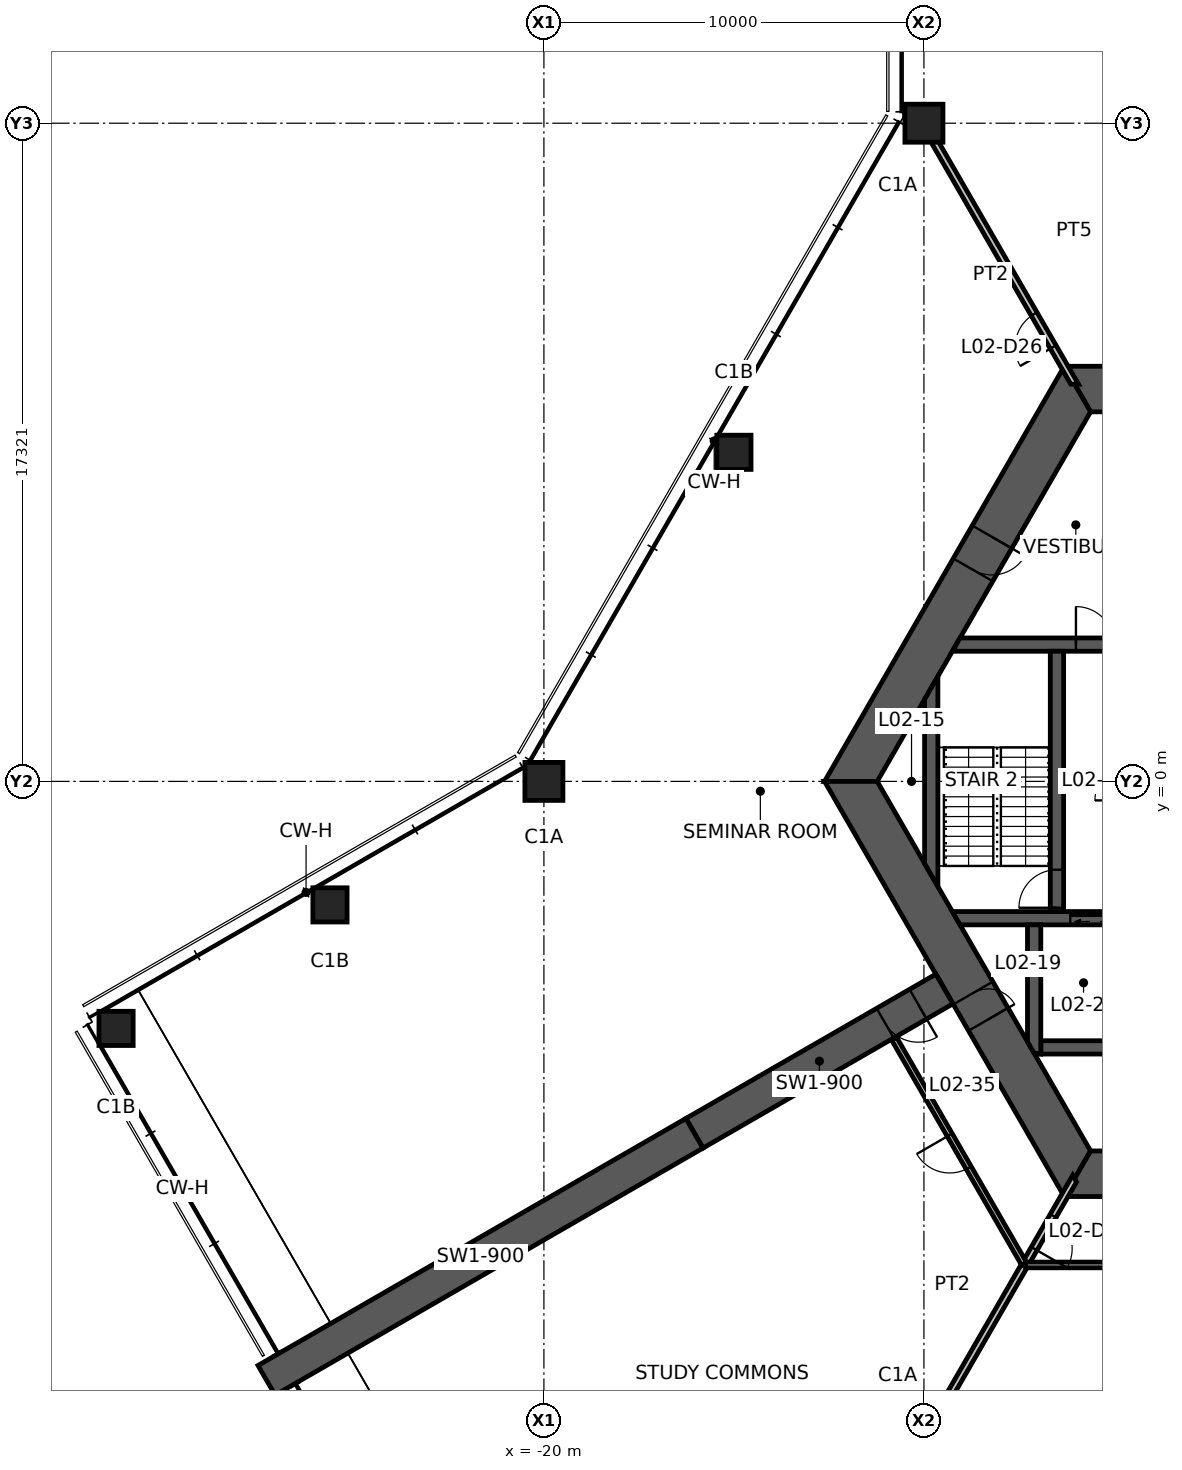
"""IFC4 building model, lengths in metres.
Left out: names, types, materials, properties, quantities, classifications, styles, units other than length and angle.
Written with IfcOpenShell. Run it as: python <this file> out.ifc"""

import sys

from ifc_helpers import new_model, si_unit, direction, frame, frame_2d, origin, origin_2d, place, context, subcontext, project, spatial, polyline, rectangle, hollow_rectangle, outline, extrude, element, fill, save


model = new_model("IFC4")
c1 = context("Model", 3, precision=1e-05, world=origin(), true_north=direction((0.0, 1.0)))
c2 = subcontext(c1, "Body", "Model", "MODEL_VIEW")
j1 = project(units=[si_unit("LENGTHUNIT", "METRE"), si_unit("PLANEANGLEUNIT", "RADIAN")], contexts=[c1])
p1 = place(None, origin())
s1 = spatial("IfcSite", under=j1, at=p1, CompositionType="ELEMENT")
p2 = place(p1, origin())
s2 = spatial("IfcBuilding", under=s1, at=p2, CompositionType="ELEMENT")
p3 = place(p2, frame((0.0, 0.0, 5.5)))
s3 = spatial("IfcBuildingStorey", under=s2, at=p3, CompositionType="ELEMENT", Elevation=5.5)
for number, where, z_axis, x_axis in (
    (1, (-10.0, 17.321, 0.0), (0.0, 0.0, 1.0), (1.0, 0.0, 0.0)),
    (2, (-20.0, 0.0, 0.0), (0.0, 0.0, 1.0), (1.0, 0.0, 0.0)),
):
    element("IfcColumn", number, at=place(p3, frame(where, z_axis=z_axis, x_axis=x_axis)), inside=s3, PredefinedType="COLUMN", context=c2, shape_type="SweptSolid", body=[
        extrude(hollow_rectangle(XDim=1.0, YDim=1.0, WallThickness=0.06, at=origin_2d()), origin(), (0.0, 0.0, 1.0), 4.5),
    ])
for number, where, z_axis, x_axis in (
    (3, (-15.0, 8.66, 0.0), (0.0, 0.0, 1.0), (1.0, 0.0, 0.0)),
    (4, (-25.629, -3.25, 0.0), (0.0, 0.0, 1.0), (1.0, 0.0, 0.0)),
    (5, (-31.258, -6.5, 0.0), (0.0, 0.0, 1.0), (1.0, 0.0, 0.0)),
):
    element("IfcColumn", number, at=place(p3, frame(where, z_axis=z_axis, x_axis=x_axis)), inside=s3, PredefinedType="COLUMN", context=c2, shape_type="SweptSolid", body=[
        extrude(hollow_rectangle(XDim=0.9, YDim=0.9, WallThickness=0.05, at=origin_2d()), origin(), (0.0, 0.0, 1.0), 4.5),
    ])
p4 = place(p3, frame((5.961, 10.325, 0.0), z_axis=(0.0, 0.0, 1.0), x_axis=(-1.0, 0.0, 0.0)))
e6 = element("IfcWall", 6, at=p4, inside=s3, PredefinedType="SHEAR", context=c2, shape_type="SweptSolid", body=[
    extrude(outline(polyline([(-0.346, -0.6), (4.574, -0.6), (5.474, -0.6), (6.449, -0.6), (7.349, -0.6), (12.269, -0.6), (11.576, 0.6), (7.349, 0.6), (6.449, 0.6), (5.474, 0.6), (4.574, 0.6), (0.346, 0.6), (-0.346, -0.6)])), origin(), (0.0, 0.0, 1.0), 4.5),
])
p5 = place(p4, frame((6.449, 0.0, 0.0)))
e7 = element("IfcOpeningElement", 7, at=p5, cuts=e6, PredefinedType="OPENING", context=c2, shape_type="SweptSolid", body=[
    extrude(rectangle(XDim=0.9, YDim=2.1, at=frame_2d((0.45, 1.05))), frame((0.0, 0.61, 0.0), z_axis=(0.0, -1.0, 0.0), x_axis=(1.0, 0.0, 0.0)), (0.0, 0.0, 1.0), 1.22),
])
p6 = place(p4, frame((4.574, 0.0, 0.0)))
e8 = element("IfcOpeningElement", 8, at=p6, cuts=e6, PredefinedType="OPENING", context=c2, shape_type="SweptSolid", body=[
    extrude(rectangle(XDim=0.9, YDim=2.1, at=frame_2d((0.45, 1.05))), frame((0.0, 0.61, 0.0), z_axis=(0.0, -1.0, 0.0), x_axis=(1.0, 0.0, 0.0)), (0.0, 0.0, 1.0), 1.22),
])
p7 = place(p3, frame((-5.961, 10.325, 0.0), z_axis=(0.0, 0.0, 1.0), x_axis=(-0.500004296715, -0.866022923061, 0.0)))
e9 = element("IfcWall", 9, at=p7, inside=s3, PredefinedType="SHEAR", context=c2, shape_type="SweptSolid", body=[
    extrude(outline(polyline([(-0.346, -0.6), (4.494, -0.6), (5.494, -0.6), (12.269, -0.6), (11.576, 0.6), (5.494, 0.6), (4.494, 0.6), (0.346, 0.6), (-0.346, -0.6)])), origin(), (0.0, 0.0, 1.0), 4.5),
])
p8 = place(p7, frame((4.494, 0.0, 0.0)))
e10 = element("IfcOpeningElement", 10, at=p8, cuts=e9, PredefinedType="OPENING", context=c2, shape_type="SweptSolid", body=[
    extrude(rectangle(XDim=1.0, YDim=2.1, at=frame_2d((0.5, 1.05))), frame((0.0, 0.61, 0.0), z_axis=(0.0, -1.0, 0.0), x_axis=(1.0, 0.0, 0.0)), (0.0, 0.0, 1.0), 1.22),
])
p9 = place(p3, frame((-11.922, 0.0, 0.0), z_axis=(0.0, 0.0, 1.0), x_axis=(0.500004296715, -0.866022923061, 0.0)))
e11 = element("IfcWall", 11, at=p9, inside=s3, PredefinedType="SHEAR", context=c2, shape_type="SweptSolid", body=[
    extrude(outline(polyline([(-0.346, -0.6), (6.431, -0.6), (7.231, -0.6), (12.269, -0.6), (11.576, 0.6), (7.231, 0.6), (6.431, 0.6), (0.346, 0.6), (-0.346, -0.6)])), origin(), (0.0, 0.0, 1.0), 4.5),
])
p10 = place(p9, frame((6.431, 0.0, 0.0)))
e12 = element("IfcOpeningElement", 12, at=p10, cuts=e11, PredefinedType="OPENING", context=c2, shape_type="SweptSolid", body=[
    extrude(rectangle(XDim=0.8, YDim=2.1, at=frame_2d((0.4, 1.05))), frame((0.0, 0.61, 0.0), z_axis=(0.0, -1.0, 0.0), x_axis=(1.0, 0.0, 0.0)), (0.0, 0.0, 1.0), 1.22),
])
p11 = place(p3, frame((-5.961, -10.325, 0.0), z_axis=(0.0, 0.0, 1.0), x_axis=(1.0, 0.0, 0.0)))
e13 = element("IfcWall", 13, at=p11, inside=s3, PredefinedType="SHEAR", context=c2, shape_type="SweptSolid", body=[
    extrude(outline(polyline([(-0.346, -0.6), (5.461, -0.6), (6.461, -0.6), (12.269, -0.6), (11.576, 0.6), (6.461, 0.6), (5.461, 0.6), (0.346, 0.6), (-0.346, -0.6)])), origin(), (0.0, 0.0, 1.0), 4.5),
])
p12 = place(p11, frame((5.461, 0.0, 0.0)))
e14 = element("IfcOpeningElement", 14, at=p12, cuts=e13, PredefinedType="OPENING", context=c2, shape_type="SweptSolid", body=[
    extrude(rectangle(XDim=1.0, YDim=2.1, at=frame_2d((0.5, 1.05))), frame((0.0, 0.61, 0.0), z_axis=(0.0, -1.0, 0.0), x_axis=(1.0, 0.0, 0.0)), (0.0, 0.0, 1.0), 1.22),
])
p13 = place(p3, frame((-9.461, -5.462, 0.0), z_axis=(0.0, 0.0, 1.0), x_axis=(-0.866019116917, -0.500010889016, 0.0)))
e15 = element("IfcWall", 15, at=p13, inside=s3, PredefinedType="SHEAR", context=c2, shape_type="SweptSolid", body=[
    extrude(rectangle(XDim=7.595, YDim=0.9, at=frame_2d((3.798, 0.0))), origin(), (0.0, 0.0, 1.0), 4.5),
])
p14 = place(p13, frame((0.8, 0.0, 0.0)))
e16 = element("IfcOpeningElement", 16, at=p14, cuts=e15, PredefinedType="OPENING", context=c2, shape_type="SweptSolid", body=[
    extrude(rectangle(XDim=1.0, YDim=2.1, at=frame_2d((0.5, 1.05))), frame((0.0, 0.46, 0.0), z_axis=(0.0, -1.0, 0.0), x_axis=(1.0, 0.0, 0.0)), (0.0, 0.0, 1.0), 0.92),
])
p15 = place(p3, frame((-16.039, -9.26, 0.0), z_axis=(0.0, 0.0, 1.0), x_axis=(-0.866024837091, -0.50000098154, 0.0)))
e17 = element("IfcWall", 17, at=p15, inside=s3, PredefinedType="SHEAR", context=c2, shape_type="SweptSolid", body=[
    extrude(rectangle(XDim=13.0, YDim=0.9, at=frame_2d((6.5, 0.0))), origin(), (0.0, 0.0, 1.0), 4.5),
])
p16 = place(p3, frame((-9.151, 3.6, 0.0), z_axis=(0.0, 0.0, 1.0), x_axis=(1.0, 0.0, 0.0)))
e18 = element("IfcWall", 18, at=p16, inside=s3, PredefinedType="SHEAR", context=c2, shape_type="SweptSolid", body=[
    extrude(outline(polyline([(-0.101, -0.175), (3.151, -0.175), (4.151, -0.175), (7.726, -0.175), (7.726, 0.175), (4.151, 0.175), (3.151, 0.175), (0.101, 0.175), (-0.101, -0.175)])), origin(), (0.0, 0.0, 1.0), 4.5),
])
p17 = place(p16, frame((3.151, 0.0, 0.0)))
e19 = element("IfcOpeningElement", 19, at=p17, cuts=e18, PredefinedType="OPENING", context=c2, shape_type="SweptSolid", body=[
    extrude(rectangle(XDim=1.0, YDim=2.1, at=frame_2d((0.5, 1.05))), frame((0.0, 0.185, 0.0), z_axis=(0.0, -1.0, 0.0), x_axis=(1.0, 0.0, 0.0)), (0.0, 0.0, 1.0), 0.37),
])
p18 = place(p3, frame((-9.151, -3.6, 0.0), z_axis=(0.0, 0.0, 1.0), x_axis=(1.0, 0.0, 0.0)))
e20 = element("IfcWall", 20, at=p18, inside=s3, PredefinedType="SHEAR", context=c2, shape_type="SweptSolid", body=[
    extrude(outline(polyline([(0.101, -0.175), (3.001, -0.175), (4.301, -0.175), (7.726, -0.175), (7.726, 0.175), (4.301, 0.175), (3.001, 0.175), (-0.101, 0.175), (0.101, -0.175)])), origin(), (0.0, 0.0, 1.0), 4.5),
])
p19 = place(p18, frame((3.001, 0.0, 0.0)))
e21 = element("IfcOpeningElement", 21, at=p19, cuts=e20, PredefinedType="OPENING", context=c2, shape_type="SweptSolid", body=[
    extrude(rectangle(XDim=1.3, YDim=2.1, at=frame_2d((0.65, 1.05))), frame((0.0, 0.185, 0.0), z_axis=(0.0, -1.0, 0.0), x_axis=(1.0, 0.0, 0.0)), (0.0, 0.0, 1.0), 0.37),
])
p20 = place(p3, frame((-6.5, -3.425, 0.0), z_axis=(0.0, 0.0, 1.0), x_axis=(0.0, 1.0, 0.0)))
e22 = element("IfcWall", 22, at=p20, inside=s3, PredefinedType="SHEAR", context=c2, shape_type="SweptSolid", body=[
    extrude(rectangle(XDim=6.85, YDim=0.35, at=frame_2d((3.425, 0.0))), origin(), (0.0, 0.0, 1.0), 4.5),
])
p21 = place(p20, frame((0.1, 0.0, 0.0)))
e23 = element("IfcOpeningElement", 23, at=p21, cuts=e22, PredefinedType="OPENING", context=c2, shape_type="SweptSolid", body=[
    extrude(rectangle(XDim=1.0, YDim=2.1, at=frame_2d((0.5, 1.05))), frame((0.0, 0.185, 0.0), z_axis=(0.0, -1.0, 0.0), x_axis=(1.0, 0.0, 0.0)), (0.0, 0.0, 1.0), 0.37),
])
p22 = place(p3, frame((-6.925, -7.0, 0.0), z_axis=(0.0, 0.0, 1.0), x_axis=(1.0, 0.0, 0.0)))
e24 = element("IfcWall", 24, at=p22, inside=s3, PredefinedType="SHEAR", context=c2, shape_type="SweptSolid", body=[
    extrude(rectangle(XDim=2.25, YDim=0.35, at=frame_2d((1.125, 0.0))), origin(), (0.0, 0.0, 1.0), 4.5),
])
p23 = place(p3, frame((-7.1, -3.775, 0.0), z_axis=(0.0, 0.0, 1.0), x_axis=(0.0, -1.0, 0.0)))
e25 = element("IfcWall", 25, at=p23, inside=s3, PredefinedType="SHEAR", context=c2, shape_type="SweptSolid", body=[
    extrude(outline(polyline([(0.0, -0.175), (3.074, -0.175), (3.377, 0.0), (3.4, 0.175), (0.0, 0.175), (0.0, -0.175)])), origin(), (0.0, 0.0, 1.0), 4.5),
])
p24 = place(p3, frame((-9.808, -2.462, 0.0), z_axis=(0.0, 0.0, 1.0), x_axis=(0.0, 1.0, 0.0)))
e26 = element("IfcWall", 26, at=p24, inside=s3, PredefinedType="SHEAR", context=c2, shape_type="SweptSolid", body=[
    extrude(outline(polyline([(-0.303, -0.175), (5.228, -0.175), (4.621, 0.175), (0.303, 0.175), (-0.303, -0.175)])), origin(), (0.0, 0.0, 1.0), 4.5),
])
p25 = place(p3, frame((-6.035, 10.453, 0.0), z_axis=(0.0, 0.0, 1.0), x_axis=(-0.499993402427, 0.866029212861, 0.0)))
e27 = element("IfcWall", 27, at=p25, inside=s3, PredefinedType="PARTITIONING", context=c2, shape_type="SweptSolid", body=[
    extrude(outline(polyline([(-0.051, -0.087), (1.129, -0.087), (2.129, -0.087), (7.93, -0.087), (7.93, 0.087), (2.129, 0.087), (1.129, 0.087), (0.051, 0.087), (-0.051, -0.087)])), origin(), (0.0, 0.0, 1.0), 3.6),
])
p26 = place(p25, frame((1.129, 0.0, 0.0)))
e28 = element("IfcOpeningElement", 28, at=p26, cuts=e27, PredefinedType="OPENING", context=c2, shape_type="SweptSolid", body=[
    extrude(rectangle(XDim=1.0, YDim=2.1, at=frame_2d((0.5, 1.05))), frame((0.0, 0.098, 0.0), z_axis=(0.0, -1.0, 0.0), x_axis=(1.0, 0.0, 0.0)), (0.0, 0.0, 1.0), 0.195),
])
p27 = place(p3, frame((-6.035, -10.453, 0.0), z_axis=(0.0, 0.0, 1.0), x_axis=(-0.499993402427, -0.866029212861, 0.0)))
e29 = element("IfcWall", 29, at=p27, inside=s3, PredefinedType="PARTITIONING", context=c2, shape_type="SweptSolid", body=[
    extrude(outline(polyline([(-0.051, -0.087), (1.129, -0.087), (2.129, -0.087), (7.93, -0.087), (7.93, 0.087), (2.129, 0.087), (1.129, 0.087), (0.051, 0.087), (-0.051, -0.087)])), origin(), (0.0, 0.0, 1.0), 3.6),
])
p28 = place(p27, frame((1.129, 0.0, 0.0)))
e30 = element("IfcOpeningElement", 30, at=p28, cuts=e29, PredefinedType="OPENING", context=c2, shape_type="SweptSolid", body=[
    extrude(rectangle(XDim=1.0, YDim=2.1, at=frame_2d((0.5, 1.05))), frame((0.0, 0.098, 0.0), z_axis=(0.0, -1.0, 0.0), x_axis=(1.0, 0.0, 0.0)), (0.0, 0.0, 1.0), 0.195),
])
p29 = place(p3, frame((-7.358, -12.705, 0.0), z_axis=(0.0, 0.0, 1.0), x_axis=(-0.499985579985, 0.866033729024, 0.0)))
e31 = element("IfcWall", 31, at=p29, inside=s3, PredefinedType="PARTITIONING", context=c2, shape_type="SweptSolid", body=[
    extrude(rectangle(XDim=6.854, YDim=0.15, at=frame_2d((3.427, 0.0))), origin(), (0.0, 0.0, 1.0), 3.5),
])
p30 = place(p29, frame((2.927, 0.0, 0.0)))
e32 = element("IfcOpeningElement", 32, at=p30, cuts=e31, PredefinedType="OPENING", context=c2, shape_type="SweptSolid", body=[
    extrude(rectangle(XDim=1.0, YDim=2.1, at=frame_2d((0.5, 1.05))), frame((0.0, 0.085, 0.0), z_axis=(0.0, -1.0, 0.0), x_axis=(1.0, 0.0, 0.0)), (0.0, 0.0, 1.0), 0.17),
])
p31 = place(p3, frame((7.347, -12.725, 0.0), z_axis=(0.0, 0.0, 1.0), x_axis=(-1.0, 0.0, 0.0)))
e33 = element("IfcWall", 33, at=p31, inside=s3, PredefinedType="PARTITIONING", context=c2, shape_type="SweptSolid", body=[
    extrude(rectangle(XDim=14.67, YDim=0.15, at=frame_2d((7.335, 0.0))), origin(), (0.0, 0.0, 1.0), 3.5),
])
p32 = place(p31, frame((6.835, 0.0, 0.0)))
e34 = element("IfcOpeningElement", 34, at=p32, cuts=e33, PredefinedType="OPENING", context=c2, shape_type="SweptSolid", body=[
    extrude(rectangle(XDim=1.0, YDim=2.1, at=frame_2d((0.5, 1.05))), frame((0.0, 0.085, 0.0), z_axis=(0.0, -1.0, 0.0), x_axis=(1.0, 0.0, 0.0)), (0.0, 0.0, 1.0), 0.17),
])
p33 = place(p10, origin())
e35 = element("IfcDoor", 35, at=p33, inside=s3, OperationType="SINGLE_SWING_RIGHT", PredefinedType="DOOR", context=c2, shape_type="SweptSolid", body=[
    extrude(rectangle(XDim=0.8, YDim=2.1, at=frame_2d((0.4, 1.05))), frame((0.0, 0.025, 0.0), z_axis=(0.0, -1.0, 0.0), x_axis=(1.0, 0.0, 0.0)), (0.0, 0.0, 1.0), 0.05),
])
fill(e12, e35)
p34 = place(p8, origin())
e36 = element("IfcDoor", 36, at=p34, inside=s3, OperationType="SINGLE_SWING_LEFT", PredefinedType="DOOR", context=c2, shape_type="SweptSolid", body=[
    extrude(rectangle(XDim=1.0, YDim=2.1, at=frame_2d((0.5, 1.05))), frame((0.0, 0.025, 0.0), z_axis=(0.0, -1.0, 0.0), x_axis=(1.0, 0.0, 0.0)), (0.0, 0.0, 1.0), 0.05),
])
fill(e10, e36)
p35 = place(p21, origin())
e37 = element("IfcDoor", 37, at=p35, inside=s3, OperationType="SINGLE_SWING_LEFT", PredefinedType="DOOR", context=c2, shape_type="SweptSolid", body=[
    extrude(rectangle(XDim=1.0, YDim=2.1, at=frame_2d((0.5, 1.05))), frame((0.0, 0.025, 0.0), z_axis=(0.0, -1.0, 0.0), x_axis=(1.0, 0.0, 0.0)), (0.0, 0.0, 1.0), 0.05),
])
fill(e23, e37)
p36 = place(p17, origin())
e38 = element("IfcDoor", 38, at=p36, inside=s3, OperationType="SINGLE_SWING_LEFT", PredefinedType="DOOR", context=c2, shape_type="SweptSolid", body=[
    extrude(rectangle(XDim=1.0, YDim=2.1, at=frame_2d((0.5, 1.05))), frame((0.0, 0.025, 0.0), z_axis=(0.0, -1.0, 0.0), x_axis=(1.0, 0.0, 0.0)), (0.0, 0.0, 1.0), 0.05),
])
fill(e19, e38)
p37 = place(p14, origin())
e39 = element("IfcDoor", 39, at=p37, inside=s3, OperationType="SINGLE_SWING_LEFT", PredefinedType="DOOR", context=c2, shape_type="SweptSolid", body=[
    extrude(rectangle(XDim=1.0, YDim=2.1, at=frame_2d((0.5, 1.05))), frame((0.0, 0.025, 0.0), z_axis=(0.0, -1.0, 0.0), x_axis=(1.0, 0.0, 0.0)), (0.0, 0.0, 1.0), 0.05),
])
fill(e16, e39)
p38 = place(p26, origin())
e40 = element("IfcDoor", 40, at=p38, inside=s3, OperationType="SINGLE_SWING_LEFT", PredefinedType="DOOR", context=c2, shape_type="SweptSolid", body=[
    extrude(rectangle(XDim=1.0, YDim=2.1, at=frame_2d((0.5, 1.05))), frame((0.0, 0.025, 0.0), z_axis=(0.0, -1.0, 0.0), x_axis=(1.0, 0.0, 0.0)), (0.0, 0.0, 1.0), 0.05),
])
fill(e28, e40)
p39 = place(p28, origin())
e41 = element("IfcDoor", 41, at=p39, inside=s3, OperationType="SINGLE_SWING_RIGHT", PredefinedType="DOOR", context=c2, shape_type="SweptSolid", body=[
    extrude(rectangle(XDim=1.0, YDim=2.1, at=frame_2d((0.5, 1.05))), frame((0.0, 0.025, 0.0), z_axis=(0.0, -1.0, 0.0), x_axis=(1.0, 0.0, 0.0)), (0.0, 0.0, 1.0), 0.05),
])
fill(e30, e41)
p40 = place(p30, origin())
e42 = element("IfcDoor", 42, at=p40, inside=s3, OperationType="SINGLE_SWING_RIGHT", PredefinedType="DOOR", context=c2, shape_type="SweptSolid", body=[
    extrude(rectangle(XDim=1.0, YDim=2.1, at=frame_2d((0.5, 1.05))), frame((0.0, 0.025, 0.0), z_axis=(0.0, -1.0, 0.0), x_axis=(1.0, 0.0, 0.0)), (0.0, 0.0, 1.0), 0.05),
])
fill(e32, e42)
p41 = place(p19, origin())
e43 = element("IfcDoor", 43, at=p41, inside=s3, OperationType="DOUBLE_DOOR_SLIDING", PredefinedType="DOOR", context=c2, shape_type="SweptSolid", body=[
    extrude(rectangle(XDim=1.3, YDim=2.1, at=frame_2d((0.65, 1.05))), frame((0.0, 0.025, 0.0), z_axis=(0.0, -1.0, 0.0), x_axis=(1.0, 0.0, 0.0)), (0.0, 0.0, 1.0), 0.05),
])
fill(e21, e43)
save(model, sys.argv[1])
